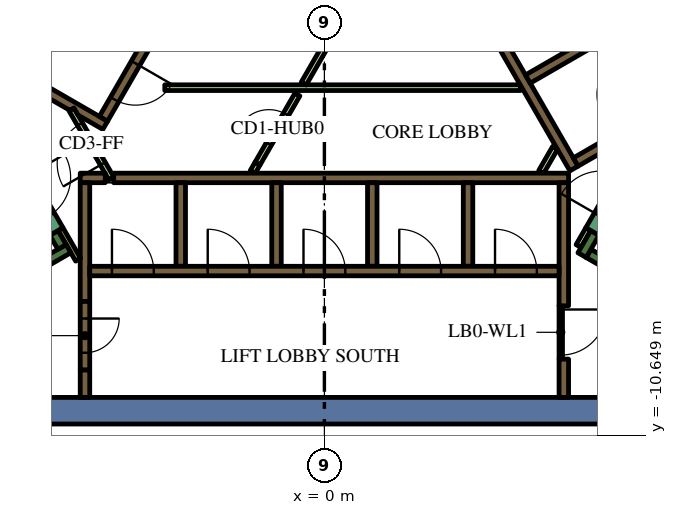
"""IFC4 building model, lengths in metres.
Left out: names, types, materials, properties, quantities, classifications, styles, units other than length and angle.
Written with IfcOpenShell. Run it as: python <this file> out.ifc"""

import sys

from ifc_helpers import new_model, si_unit, direction, frame, frame_2d, origin, place, context, subcontext, project, spatial, polyline, rectangle, outline, extrude, element, fill, save


model = new_model("IFC4")
c1 = context("Model", 3, precision=1e-05, world=origin(), true_north=direction((0.0, 1.0)))
c2 = subcontext(c1, "Body", "Model", "MODEL_VIEW")
j1 = project(units=[si_unit("LENGTHUNIT", "METRE"), si_unit("PLANEANGLEUNIT", "RADIAN")], contexts=[c1])
p1 = place(None, origin())
s1 = spatial("IfcSite", under=j1, at=p1, CompositionType="ELEMENT")
p2 = place(p1, origin())
s2 = spatial("IfcBuilding", under=s1, at=p2, CompositionType="ELEMENT")
p3 = place(p2, frame((0.0, 0.0, 243.6)))
s3 = spatial("IfcBuildingStorey", under=s2, at=p3, CompositionType="ELEMENT", Elevation=243.6)
p4 = place(p3, frame((8.904, -10.0, 0.0), z_axis=(0.0, 0.0, 1.0), x_axis=(-1.0, 0.0, 0.0)))
e1 = element("IfcWall", 1, at=p4, inside=s3, PredefinedType="SOLIDWALL", context=c2, shape_type="SweptSolid", body=[
    extrude(rectangle(XDim=22.226, YDim=0.7, at=frame_2d((11.113, 0.0))), origin(), (0.0, 0.0, 1.0), 4.2),
])
p5 = place(p3, frame((-12.625, -1.867, 0.0), z_axis=(0.0, 0.0, 1.0), x_axis=(0.499996974394, 0.866027150612, 0.0)))
e2 = element("IfcWall", 2, at=p5, inside=s3, PredefinedType="SOLIDWALL", context=c2, shape_type="SweptSolid", body=[
    extrude(rectangle(XDim=15.858, YDim=0.7, at=frame_2d((7.929, 0.0))), origin(), (0.0, 0.0, 1.0), 4.2),
])
p6 = place(p3, frame((12.84, -9.261, 0.0), z_axis=(0.0, 0.0, 1.0), x_axis=(-0.866013990052, 0.500019768644, 0.0)))
e3 = element("IfcWall", 3, at=p6, inside=s3, PredefinedType="SOLIDWALL", context=c2, shape_type="SweptSolid", body=[
    extrude(rectangle(XDim=6.8, YDim=0.25, at=frame_2d((3.4, 0.0))), origin(), (0.0, 0.0, 1.0), 4.2),
])
p7 = place(p3, frame((6.78, -5.906, 0.0), z_axis=(0.0, 0.0, 1.0), x_axis=(0.500223362819, 0.865896406789, 0.0)))
e4 = element("IfcWall", 4, at=p7, inside=s3, PredefinedType="SOLIDWALL", context=c2, shape_type="SweptSolid", body=[
    extrude(rectangle(XDim=0.675, YDim=0.25, at=frame_2d((0.337, 0.0))), origin(), (0.0, 0.0, 1.0), 4.2),
])
p8 = place(p3, frame((-12.84, -9.261, 0.0), z_axis=(0.0, 0.0, 1.0), x_axis=(0.866016039709, 0.500016218704, 0.0)))
e5 = element("IfcWall", 5, at=p8, inside=s3, PredefinedType="SOLIDWALL", context=c2, shape_type="SweptSolid", body=[
    extrude(rectangle(XDim=7.05, YDim=0.25, at=frame_2d((3.525, 0.0))), origin(), (0.0, 0.0, 1.0), 4.2),
])
p9 = place(p3, frame((-6.905, -5.69, 0.0), z_axis=(0.0, 0.0, 1.0), x_axis=(-0.500402024738, 0.865793170242, 0.0)))
e6 = element("IfcWall", 6, at=p9, inside=s3, PredefinedType="SOLIDWALL", context=c2, shape_type="SweptSolid", body=[
    extrude(rectangle(XDim=0.425, YDim=0.25, at=frame_2d((0.212, 0.0))), origin(), (0.0, 0.0, 1.0), 4.2),
])
p10 = place(p3, frame((-6.3, -8.925, 0.0), z_axis=(0.0, 0.0, 1.0), x_axis=(0.0, -1.0, 0.0)))
e7 = element("IfcWall", 7, at=p10, inside=s3, PredefinedType="SOLIDWALL", context=c2, shape_type="SweptSolid", body=[
    extrude(rectangle(XDim=0.725, YDim=0.25, at=frame_2d((0.363, 0.0))), origin(), (0.0, 0.0, 1.0), 4.2),
])
p11 = place(p3, frame((-5.545, -3.875, 0.0), z_axis=(0.0, 0.0, 1.0), x_axis=(1.0, 0.0, 0.0)))
e8 = element("IfcWall", 8, at=p11, inside=s3, PredefinedType="SOLIDWALL", context=c2, shape_type="SweptSolid", body=[
    extrude(rectangle(XDim=11.97, YDim=0.25, at=frame_2d((5.985, 0.0))), origin(), (0.0, 0.0, 1.0), 4.2),
])
p12 = place(p3, frame((-6.425, -3.875, 0.0), z_axis=(0.0, 0.0, 1.0), x_axis=(1.0, 0.0, 0.0)))
e9 = element("IfcWall", 9, at=p12, inside=s3, PredefinedType="SOLIDWALL", context=c2, shape_type="SweptSolid", body=[
    extrude(rectangle(XDim=0.658, YDim=0.25, at=frame_2d((0.329, 0.0))), origin(), (0.0, 0.0, 1.0), 4.2),
])
p13 = place(p3, frame((6.3, -7.24, 0.0), z_axis=(0.0, 0.0, 1.0), x_axis=(0.0, 1.0, 0.0)))
e10 = element("IfcWall", 10, at=p13, inside=s3, PredefinedType="SOLIDWALL", context=c2, shape_type="SweptSolid", body=[
    extrude(rectangle(XDim=3.24, YDim=0.25, at=frame_2d((1.62, 0.0))), origin(), (0.0, 0.0, 1.0), 4.2),
])
p14 = place(p3, frame((6.3, -9.65, 0.0), z_axis=(0.0, 0.0, 1.0), x_axis=(0.0, 1.0, 0.0)))
e11 = element("IfcWall", 11, at=p14, inside=s3, PredefinedType="SOLIDWALL", context=c2, shape_type="SweptSolid", body=[
    extrude(rectangle(XDim=1.008, YDim=0.25, at=frame_2d((0.504, 0.0))), origin(), (0.0, 0.0, 1.0), 4.2),
])
for number, where, z_axis, x_axis in (
    (12, (3.78, -4.0, 0.0), (0.0, 0.0, 1.0), (0.0, -1.0, 0.0)),
    (13, (1.26, -4.0, 0.0), (0.0, 0.0, 1.0), (0.0, -1.0, 0.0)),
    (14, (-1.26, -4.0, 0.0), (0.0, 0.0, 1.0), (0.0, -1.0, 0.0)),
    (15, (-3.78, -4.0, 0.0), (0.0, 0.0, 1.0), (0.0, -1.0, 0.0)),
):
    element("IfcWall", number, at=place(p3, frame(where, z_axis=z_axis, x_axis=x_axis)), inside=s3, PredefinedType="SOLIDWALL", context=c2, shape_type="SweptSolid", body=[
        extrude(rectangle(XDim=2.2, YDim=0.25, at=frame_2d((1.1, 0.0))), origin(), (0.0, 0.0, 1.0), 4.2),
    ])
p15 = place(p3, frame((-6.3, -7.125, 0.0), z_axis=(0.0, 0.0, 1.0), x_axis=(0.0, 1.0, 0.0)))
e16 = element("IfcWall", 16, at=p15, inside=s3, PredefinedType="SOLIDWALL", context=c2, shape_type="SweptSolid", body=[
    extrude(rectangle(XDim=3.125, YDim=0.25, at=frame_2d((1.562, 0.0))), origin(), (0.0, 0.0, 1.0), 4.2),
])
p16 = place(p3, frame((6.568, -3.627, 0.0), z_axis=(0.0, 0.0, 1.0), x_axis=(-0.499999455981, 0.866025717874, 0.0)))
e17 = element("IfcWall", 17, at=p16, inside=s3, PredefinedType="SOLIDWALL", context=c2, shape_type="SweptSolid", body=[
    extrude(rectangle(XDim=11.978, YDim=0.25, at=frame_2d((5.989, 0.0))), origin(), (0.0, 0.0, 1.0), 4.2),
])
p17 = place(p3, frame((5.354, -1.274, 0.0), z_axis=(0.0, 0.0, 1.0), x_axis=(0.866008176907, 0.50002983664, 0.0)))
e18 = element("IfcWall", 18, at=p17, inside=s3, PredefinedType="SOLIDWALL", context=c2, shape_type="SweptSolid", body=[
    extrude(rectangle(XDim=2.2, YDim=0.25, at=frame_2d((1.1, 0.0))), origin(), (0.0, 0.0, 1.0), 4.2),
])
p18 = place(p3, frame((6.614, -3.456, 0.0), z_axis=(0.0, 0.0, 1.0), x_axis=(0.866025089694, 0.500000544019, 0.0)))
e19 = element("IfcWall", 19, at=p18, inside=s3, PredefinedType="SOLIDWALL", context=c2, shape_type="SweptSolid", body=[
    extrude(rectangle(XDim=2.305, YDim=0.25, at=frame_2d((1.153, 0.0))), origin(), (0.0, 0.0, 1.0), 4.2),
])
p19 = place(p3, frame((-8.06, -1.311, 0.0), z_axis=(0.0, 0.0, 1.0), x_axis=(0.50000273126, 0.866023826885, 0.0)))
e20 = element("IfcWall", 20, at=p19, inside=s3, PredefinedType="SOLIDWALL", context=c2, shape_type="SweptSolid", body=[
    extrude(rectangle(XDim=10.33, YDim=0.25, at=frame_2d((5.165, 0.0))), origin(), (0.0, 0.0, 1.0), 4.2),
])
p20 = place(p3, origin())
e21 = element("IfcWall", 21, at=p20, inside=s3, PredefinedType="SOLIDWALL", context=c2, shape_type="SweptSolid", body=[
    extrude(outline(polyline([(-5.922, -2.257), (-5.922, -2.257), (-5.705, -2.382), (-5.83, -2.598), (-6.483, -2.221), (-6.591, -2.033), (-6.591, -2.033), (-6.7, -2.096), (-7.952, -1.373), (-7.827, -1.156), (-5.922, -2.257)])), origin(), (0.0, 0.0, 1.0), 4.2),
])
p21 = place(p3, frame((-6.48, -6.027, 0.0), z_axis=(0.0, 0.0, 1.0), x_axis=(-0.499927229454, 0.866067413802, 0.0)))
e22 = element("IfcWall", 22, at=p21, inside=s3, PredefinedType="PARTITIONING", context=c2, shape_type="SweptSolid", body=[
    extrude(rectangle(XDim=0.929, YDim=0.15, at=frame_2d((0.464, 0.0))), origin(), (0.0, 0.0, 1.0), 4.2),
])
p22 = place(p3, frame((6.945, -5.222, 0.0), z_axis=(0.0, 0.0, 1.0), x_axis=(-0.499818422106, -0.866130212453, 0.0)))
e23 = element("IfcWall", 23, at=p22, inside=s3, PredefinedType="PARTITIONING", context=c2, shape_type="SweptSolid", body=[
    extrude(rectangle(XDim=0.514, YDim=0.15, at=frame_2d((0.257, 0.0))), origin(), (0.0, 0.0, 1.0), 3.45),
])
p23 = place(p3, frame((5.705, -3.718, 0.0), z_axis=(0.0, 0.0, 1.0), x_axis=(0.499962090823, 0.866047289552, 0.0)))
e24 = element("IfcWall", 24, at=p23, inside=s3, PredefinedType="PARTITIONING", context=c2, shape_type="SweptSolid", body=[
    extrude(rectangle(XDim=0.735, YDim=0.15, at=frame_2d((0.367, 0.0))), origin(), (0.0, 0.0, 1.0), 3.45),
])
p24 = place(p3, frame((-4.2, -1.5, 0.0), z_axis=(0.0, 0.0, 1.0), x_axis=(1.0, 0.0, 0.0)))
e25 = element("IfcWall", 25, at=p24, inside=s3, PredefinedType="PARTITIONING", context=c2, shape_type="SweptSolid", body=[
    extrude(rectangle(XDim=9.359, YDim=0.15, at=frame_2d((4.68, 0.0))), origin(), (0.0, 0.0, 1.0), 3.45),
])
p25 = place(p3, frame((-0.544, -1.393, 0.0), z_axis=(0.0, 0.0, 1.0), x_axis=(0.499928740635, 0.866066541489, 0.0)))
e26 = element("IfcWall", 26, at=p25, inside=s3, PredefinedType="PARTITIONING", context=c2, shape_type="SweptSolid", body=[
    extrude(rectangle(XDim=1.912, YDim=0.15, at=frame_2d((0.956, 0.0))), origin(), (0.0, 0.0, 1.0), 3.45),
])
p26 = place(p3, frame((-1.887, -3.718, 0.0), z_axis=(0.0, 0.0, 1.0), x_axis=(0.500165633897, 0.865929753888, 0.0)))
e27 = element("IfcWall", 27, at=p26, inside=s3, PredefinedType="PARTITIONING", context=c2, shape_type="SweptSolid", body=[
    extrude(rectangle(XDim=0.254, YDim=0.15, at=frame_2d((0.127, 0.0))), origin(), (0.0, 0.0, 1.0), 3.45),
])
p27 = place(p3, frame((-6.175, -6.325, 0.0), z_axis=(0.0, 0.0, 1.0), x_axis=(1.0, 0.0, 0.0)))
e28 = element("IfcWall", 28, at=p27, inside=s3, PredefinedType="SOLIDWALL", context=c2, shape_type="SweptSolid", body=[
    extrude(rectangle(XDim=12.35, YDim=0.25, at=frame_2d((6.175, 0.0))), origin(), (0.0, 0.0, 1.0), 4.2),
])
p28 = place(p27, frame((0.585, 0.0, 0.0)))
e29 = element("IfcOpeningElement", 29, at=p28, cuts=e28, PredefinedType="OPENING", context=c2, shape_type="SweptSolid", body=[
    extrude(rectangle(XDim=1.1, YDim=2.1, at=frame_2d((0.55, 1.05))), frame((0.0, 0.135, 0.0), z_axis=(0.0, -1.0, 0.0), x_axis=(1.0, 0.0, 0.0)), (0.0, 0.0, 1.0), 0.27),
])
p29 = place(p27, frame((3.105, 0.0, 0.0)))
e30 = element("IfcOpeningElement", 30, at=p29, cuts=e28, PredefinedType="OPENING", context=c2, shape_type="SweptSolid", body=[
    extrude(rectangle(XDim=1.1, YDim=2.1, at=frame_2d((0.55, 1.05))), frame((0.0, 0.135, 0.0), z_axis=(0.0, -1.0, 0.0), x_axis=(1.0, 0.0, 0.0)), (0.0, 0.0, 1.0), 0.27),
])
p30 = place(p27, frame((5.625, 0.0, 0.0)))
e31 = element("IfcOpeningElement", 31, at=p30, cuts=e28, PredefinedType="OPENING", context=c2, shape_type="SweptSolid", body=[
    extrude(rectangle(XDim=1.1, YDim=2.1, at=frame_2d((0.55, 1.05))), frame((0.0, 0.135, 0.0), z_axis=(0.0, -1.0, 0.0), x_axis=(1.0, 0.0, 0.0)), (0.0, 0.0, 1.0), 0.27),
])
p31 = place(p27, frame((8.145, 0.0, 0.0)))
e32 = element("IfcOpeningElement", 32, at=p31, cuts=e28, PredefinedType="OPENING", context=c2, shape_type="SweptSolid", body=[
    extrude(rectangle(XDim=1.1, YDim=2.1, at=frame_2d((0.55, 1.05))), frame((0.0, 0.135, 0.0), z_axis=(0.0, -1.0, 0.0), x_axis=(1.0, 0.0, 0.0)), (0.0, 0.0, 1.0), 0.27),
])
p32 = place(p27, frame((10.665, 0.0, 0.0)))
e33 = element("IfcOpeningElement", 33, at=p32, cuts=e28, PredefinedType="OPENING", context=c2, shape_type="SweptSolid", body=[
    extrude(rectangle(XDim=1.1, YDim=2.1, at=frame_2d((0.55, 1.05))), frame((0.0, 0.135, 0.0), z_axis=(0.0, -1.0, 0.0), x_axis=(1.0, 0.0, 0.0)), (0.0, 0.0, 1.0), 0.27),
])
p33 = place(p3, frame((8.565, -2.185, 0.0), z_axis=(0.0, 0.0, 1.0), x_axis=(-0.499997954832, 0.866026584559, 0.0)))
e34 = element("IfcWall", 34, at=p33, inside=s3, PredefinedType="SOLIDWALL", context=c2, shape_type="SweptSolid", body=[
    extrude(rectangle(XDim=12.35, YDim=0.25, at=frame_2d((6.175, 0.0))), origin(), (0.0, 0.0, 1.0), 4.2),
])
p34 = place(p33, frame((0.585, 0.0, 0.0)))
e35 = element("IfcOpeningElement", 35, at=p34, cuts=e34, PredefinedType="OPENING", context=c2, shape_type="SweptSolid", body=[
    extrude(rectangle(XDim=1.1, YDim=2.1, at=frame_2d((0.55, 1.05))), frame((0.0, 0.135, 0.0), z_axis=(0.0, -1.0, 0.0), x_axis=(1.0, 0.0, 0.0)), (0.0, 0.0, 1.0), 0.27),
])
p35 = place(p3, frame((-0.898, 6.194, 0.0), z_axis=(0.0, 0.0, 1.0), x_axis=(-0.499996202215, -0.866027596426, 0.0)))
e36 = element("IfcWall", 36, at=p35, inside=s3, PredefinedType="SOLIDWALL", context=c2, shape_type="SweptSolid", body=[
    extrude(rectangle(XDim=9.83, YDim=0.25, at=frame_2d((4.915, 0.0))), origin(), (0.0, 0.0, 1.0), 4.2),
])
p36 = place(p35, frame((0.585, 0.0, 0.0)))
e37 = element("IfcOpeningElement", 37, at=p36, cuts=e36, PredefinedType="OPENING", context=c2, shape_type="SweptSolid", body=[
    extrude(rectangle(XDim=1.1, YDim=2.1, at=frame_2d((0.55, 1.05))), frame((0.0, 0.135, 0.0), z_axis=(0.0, -1.0, 0.0), x_axis=(1.0, 0.0, 0.0)), (0.0, 0.0, 1.0), 0.27),
])
p37 = place(p35, frame((3.105, 0.0, 0.0)))
e38 = element("IfcOpeningElement", 38, at=p37, cuts=e36, PredefinedType="OPENING", context=c2, shape_type="SweptSolid", body=[
    extrude(rectangle(XDim=1.1, YDim=2.1, at=frame_2d((0.55, 1.05))), frame((0.0, 0.135, 0.0), z_axis=(0.0, -1.0, 0.0), x_axis=(1.0, 0.0, 0.0)), (0.0, 0.0, 1.0), 0.27),
])
p38 = place(p35, frame((5.625, 0.0, 0.0)))
e39 = element("IfcOpeningElement", 39, at=p38, cuts=e36, PredefinedType="OPENING", context=c2, shape_type="SweptSolid", body=[
    extrude(rectangle(XDim=1.1, YDim=2.1, at=frame_2d((0.55, 1.05))), frame((0.0, 0.135, 0.0), z_axis=(0.0, -1.0, 0.0), x_axis=(1.0, 0.0, 0.0)), (0.0, 0.0, 1.0), 0.27),
])
p39 = place(p35, frame((8.145, 0.0, 0.0)))
e40 = element("IfcOpeningElement", 40, at=p39, cuts=e36, PredefinedType="OPENING", context=c2, shape_type="SweptSolid", body=[
    extrude(rectangle(XDim=1.1, YDim=2.1, at=frame_2d((0.55, 1.05))), frame((0.0, 0.135, 0.0), z_axis=(0.0, -1.0, 0.0), x_axis=(1.0, 0.0, 0.0)), (0.0, 0.0, 1.0), 0.27),
])
p40 = place(p3, frame((7.053, -5.284, 0.0), z_axis=(0.0, 0.0, 1.0), x_axis=(0.500078061341, 0.865980330357, 0.0)))
e41 = element("IfcWall", 41, at=p40, inside=s3, PredefinedType="SOLIDWALL", context=c2, shape_type="SweptSolid", body=[
    extrude(rectangle(XDim=2.1, YDim=0.4, at=frame_2d((1.05, 0.0))), origin(), (0.0, 0.0, 1.0), 4.2),
])
p41 = place(p40, frame((0.45, 0.0, 0.0)))
e42 = element("IfcOpeningElement", 42, at=p41, cuts=e41, PredefinedType="OPENING", context=c2, shape_type="SweptSolid", body=[
    extrude(rectangle(XDim=1.2, YDim=2.1, at=frame_2d((0.6, 1.05))), frame((0.0, 0.21, 0.0), z_axis=(0.0, -1.0, 0.0), x_axis=(1.0, 0.0, 0.0)), (0.0, 0.0, 1.0), 0.42),
])
p42 = place(p3, frame((-8.103, -3.466, 0.0), z_axis=(0.0, 0.0, 1.0), x_axis=(0.500078061341, -0.865980330357, 0.0)))
e43 = element("IfcWall", 43, at=p42, inside=s3, PredefinedType="SOLIDWALL", context=c2, shape_type="SweptSolid", body=[
    extrude(rectangle(XDim=2.1, YDim=0.4, at=frame_2d((1.05, 0.0))), origin(), (0.0, 0.0, 1.0), 4.2),
])
p43 = place(p42, frame((0.45, 0.0, 0.0)))
e44 = element("IfcOpeningElement", 44, at=p43, cuts=e43, PredefinedType="OPENING", context=c2, shape_type="SweptSolid", body=[
    extrude(rectangle(XDim=1.2, YDim=2.1, at=frame_2d((0.6, 1.05))), frame((0.0, 0.21, 0.0), z_axis=(0.0, -1.0, 0.0), x_axis=(1.0, 0.0, 0.0)), (0.0, 0.0, 1.0), 0.42),
])
p44 = place(p3, frame((-6.3, -7.125, 0.0), z_axis=(0.0, 0.0, 1.0), x_axis=(0.0, -1.0, 0.0)))
e45 = element("IfcWall", 45, at=p44, inside=s3, PredefinedType="SOLIDWALL", context=c2, shape_type="SweptSolid", body=[
    extrude(rectangle(XDim=1.8, YDim=0.25, at=frame_2d((0.9, 0.0))), origin(), (0.0, 0.0, 1.0), 4.2),
])
p45 = place(p44, frame((0.45, 0.0, 0.0)))
e46 = element("IfcOpeningElement", 46, at=p45, cuts=e45, PredefinedType="OPENING", context=c2, shape_type="SweptSolid", body=[
    extrude(rectangle(XDim=0.9, YDim=2.1, at=frame_2d((0.45, 1.05))), frame((0.0, 0.135, 0.0), z_axis=(0.0, -1.0, 0.0), x_axis=(1.0, 0.0, 0.0)), (0.0, 0.0, 1.0), 0.27),
])
p46 = place(p3, frame((-1.76, -3.498, 0.0), z_axis=(0.0, 0.0, 1.0), x_axis=(0.499977374825, 0.866038466041, 0.0)))
e47 = element("IfcWall", 47, at=p46, inside=s3, PredefinedType="PARTITIONING", context=c2, shape_type="SweptSolid", body=[
    extrude(rectangle(XDim=2.1, YDim=0.15, at=frame_2d((1.05, 0.0))), origin(), (0.0, 0.0, 1.0), 3.45),
])
p47 = place(p46, frame((0.6, 0.0, 0.0)))
e48 = element("IfcOpeningElement", 48, at=p47, cuts=e47, PredefinedType="OPENING", context=c2, shape_type="SweptSolid", body=[
    extrude(rectangle(XDim=0.9, YDim=2.1, at=frame_2d((0.45, 1.05))), frame((0.0, 0.085, 0.0), z_axis=(0.0, -1.0, 0.0), x_axis=(1.0, 0.0, 0.0)), (0.0, 0.0, 1.0), 0.17),
])
p48 = place(p3, frame((-5.606, -3.89, 0.0), z_axis=(0.0, 0.0, 1.0), x_axis=(-0.500027713859, 0.866009402589, 0.0)))
e49 = element("IfcWall", 49, at=p48, inside=s3, PredefinedType="PARTITIONING", context=c2, shape_type="SweptSolid", body=[
    extrude(rectangle(XDim=2.1, YDim=0.15, at=frame_2d((1.05, 0.0))), origin(), (0.0, 0.0, 1.0), 3.45),
])
p49 = place(p48, frame((0.45, 0.0, 0.0)))
e50 = element("IfcOpeningElement", 50, at=p49, cuts=e49, PredefinedType="OPENING", context=c2, shape_type="SweptSolid", body=[
    extrude(rectangle(XDim=1.2, YDim=2.1, at=frame_2d((0.6, 1.05))), frame((0.0, 0.085, 0.0), z_axis=(0.0, -1.0, 0.0), x_axis=(1.0, 0.0, 0.0)), (0.0, 0.0, 1.0), 0.17),
])
p50 = place(p3, frame((6.22, -7.237, 0.0), z_axis=(0.0, 0.0, 1.0), x_axis=(0.0, -1.0, 0.0)))
e51 = element("IfcWall", 51, at=p50, inside=s3, PredefinedType="PARTITIONING", context=c2, shape_type="SweptSolid", body=[
    extrude(rectangle(XDim=1.4, YDim=0.09, at=frame_2d((0.7, 0.0))), origin(), (0.0, 0.0, 1.0), 3.45),
])
p51 = place(p50, frame((0.1, 0.0, 0.0)))
e52 = element("IfcOpeningElement", 52, at=p51, cuts=e51, PredefinedType="OPENING", context=c2, shape_type="SweptSolid", body=[
    extrude(rectangle(XDim=1.2, YDim=2.1, at=frame_2d((0.6, 1.05))), frame((0.0, 0.055, 0.0), z_axis=(0.0, -1.0, 0.0), x_axis=(1.0, 0.0, 0.0)), (0.0, 0.0, 1.0), 0.11),
])
p52 = place(p28, origin())
e53 = element("IfcDoor", 53, at=p52, inside=s3, OperationType="DOUBLE_DOOR_SLIDING", PredefinedType="DOOR", context=c2, shape_type="SweptSolid", body=[
    extrude(rectangle(XDim=1.1, YDim=2.1, at=frame_2d((0.55, 1.05))), frame((0.0, 0.025, 0.0), z_axis=(0.0, -1.0, 0.0), x_axis=(1.0, 0.0, 0.0)), (0.0, 0.0, 1.0), 0.05),
])
fill(e29, e53)
p53 = place(p29, origin())
e54 = element("IfcDoor", 54, at=p53, inside=s3, OperationType="DOUBLE_DOOR_SLIDING", PredefinedType="DOOR", context=c2, shape_type="SweptSolid", body=[
    extrude(rectangle(XDim=1.1, YDim=2.1, at=frame_2d((0.55, 1.05))), frame((0.0, 0.025, 0.0), z_axis=(0.0, -1.0, 0.0), x_axis=(1.0, 0.0, 0.0)), (0.0, 0.0, 1.0), 0.05),
])
fill(e30, e54)
p54 = place(p30, origin())
e55 = element("IfcDoor", 55, at=p54, inside=s3, OperationType="DOUBLE_DOOR_SLIDING", PredefinedType="DOOR", context=c2, shape_type="SweptSolid", body=[
    extrude(rectangle(XDim=1.1, YDim=2.1, at=frame_2d((0.55, 1.05))), frame((0.0, 0.025, 0.0), z_axis=(0.0, -1.0, 0.0), x_axis=(1.0, 0.0, 0.0)), (0.0, 0.0, 1.0), 0.05),
])
fill(e31, e55)
p55 = place(p31, origin())
e56 = element("IfcDoor", 56, at=p55, inside=s3, OperationType="DOUBLE_DOOR_SLIDING", PredefinedType="DOOR", context=c2, shape_type="SweptSolid", body=[
    extrude(rectangle(XDim=1.1, YDim=2.1, at=frame_2d((0.55, 1.05))), frame((0.0, 0.025, 0.0), z_axis=(0.0, -1.0, 0.0), x_axis=(1.0, 0.0, 0.0)), (0.0, 0.0, 1.0), 0.05),
])
fill(e32, e56)
p56 = place(p32, origin())
e57 = element("IfcDoor", 57, at=p56, inside=s3, OperationType="DOUBLE_DOOR_SLIDING", PredefinedType="DOOR", context=c2, shape_type="SweptSolid", body=[
    extrude(rectangle(XDim=1.1, YDim=2.1, at=frame_2d((0.55, 1.05))), frame((0.0, 0.025, 0.0), z_axis=(0.0, -1.0, 0.0), x_axis=(1.0, 0.0, 0.0)), (0.0, 0.0, 1.0), 0.05),
])
fill(e33, e57)
p57 = place(p39, origin())
e58 = element("IfcDoor", 58, at=p57, inside=s3, OperationType="DOUBLE_DOOR_SLIDING", PredefinedType="DOOR", context=c2, shape_type="SweptSolid", body=[
    extrude(rectangle(XDim=1.1, YDim=2.1, at=frame_2d((0.55, 1.05))), frame((0.0, 0.025, 0.0), z_axis=(0.0, -1.0, 0.0), x_axis=(1.0, 0.0, 0.0)), (0.0, 0.0, 1.0), 0.05),
])
fill(e40, e58)
p58 = place(p45, origin())
e59 = element("IfcDoor", 59, at=p58, inside=s3, OperationType="SINGLE_SWING_LEFT", PredefinedType="DOOR", context=c2, shape_type="SweptSolid", body=[
    extrude(rectangle(XDim=0.9, YDim=2.1, at=frame_2d((0.45, 1.05))), frame((0.0, 0.025, 0.0), z_axis=(0.0, -1.0, 0.0), x_axis=(1.0, 0.0, 0.0)), (0.0, 0.0, 1.0), 0.05),
])
fill(e46, e59)
p59 = place(p47, origin())
e60 = element("IfcDoor", 60, at=p59, inside=s3, OperationType="SINGLE_SWING_LEFT", PredefinedType="DOOR", context=c2, shape_type="SweptSolid", body=[
    extrude(rectangle(XDim=0.9, YDim=2.1, at=frame_2d((0.45, 1.05))), frame((0.0, 0.025, 0.0), z_axis=(0.0, -1.0, 0.0), x_axis=(1.0, 0.0, 0.0)), (0.0, 0.0, 1.0), 0.05),
])
fill(e48, e60)
p60 = place(p49, origin())
e61 = element("IfcDoor", 61, at=p60, inside=s3, OperationType="SINGLE_SWING_LEFT", PredefinedType="DOOR", context=c2, shape_type="SweptSolid", body=[
    extrude(rectangle(XDim=1.2, YDim=2.1, at=frame_2d((0.6, 1.05))), frame((0.0, 0.025, 0.0), z_axis=(0.0, -1.0, 0.0), x_axis=(1.0, 0.0, 0.0)), (0.0, 0.0, 1.0), 0.05),
])
fill(e50, e61)
p61 = place(p51, origin())
e62 = element("IfcDoor", 62, at=p61, inside=s3, OperationType="SINGLE_SWING_LEFT", PredefinedType="DOOR", context=c2, shape_type="SweptSolid", body=[
    extrude(rectangle(XDim=1.2, YDim=2.1, at=frame_2d((0.6, 1.05))), frame((0.0, 0.025, 0.0), z_axis=(0.0, -1.0, 0.0), x_axis=(1.0, 0.0, 0.0)), (0.0, 0.0, 1.0), 0.05),
])
fill(e52, e62)
save(model, sys.argv[1])
